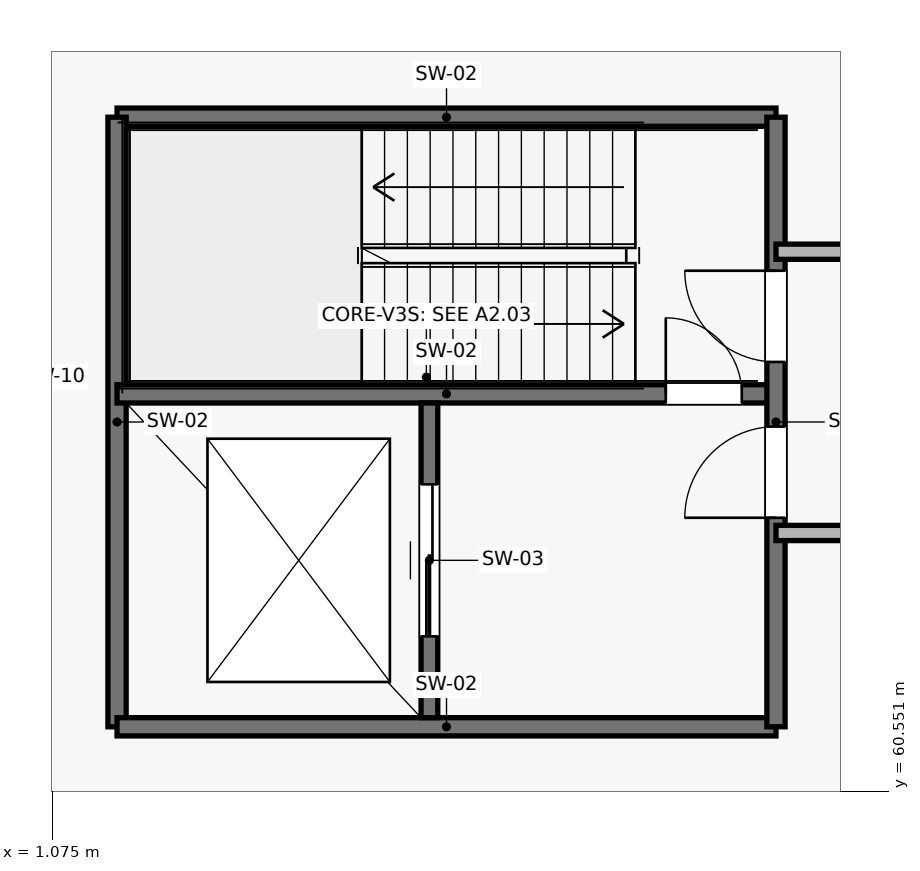
"""IFC4 building model, lengths in metres.
Left out: names, types, materials, properties, quantities, classifications, styles, units other than length and angle.
Written with IfcOpenShell. Run it as: python <this file> out.ifc"""

import sys

from ifc_helpers import new_model, si_unit, direction, frame, frame_2d, origin, place, context, subcontext, project, spatial, rectangle, extrude, element, fill, save


model = new_model("IFC4")
c1 = context("Model", 3, precision=1e-05, world=origin(), true_north=direction((0.0, 1.0)))
c2 = subcontext(c1, "Body", "Model", "MODEL_VIEW")
j1 = project(units=[si_unit("LENGTHUNIT", "METRE"), si_unit("PLANEANGLEUNIT", "RADIAN")], contexts=[c1])
p1 = place(None, origin())
s1 = spatial("IfcSite", under=j1, at=p1, CompositionType="ELEMENT")
p2 = place(p1, origin())
s2 = spatial("IfcBuilding", under=s1, at=p2, CompositionType="ELEMENT")
p3 = place(p2, frame((0.0, 0.0, 6.6)))
s3 = spatial("IfcBuildingStorey", under=s2, at=p3, CompositionType="ELEMENT", Elevation=6.6)
p4 = place(p3, frame((10.6, 69.42, 0.0), z_axis=(0.0, 0.0, 1.0), x_axis=(-1.0, 0.0, 0.0)))
e1 = element("IfcWall", 1, at=p4, inside=s3, PredefinedType="SHEAR", context=c2, shape_type="SweptSolid", body=[
    extrude(rectangle(XDim=8.67, YDim=0.24, at=frame_2d((4.335, 0.0))), origin(), (0.0, 0.0, 1.0), 4.49),
])
p5 = place(p3, frame((1.93, 69.42, 0.0), z_axis=(0.0, 0.0, 1.0), x_axis=(0.0, -1.0, 0.0)))
e2 = element("IfcWall", 2, at=p5, inside=s3, PredefinedType="SHEAR", context=c2, shape_type="SweptSolid", body=[
    extrude(rectangle(XDim=8.02, YDim=0.24, at=frame_2d((4.01, 0.0))), origin(), (0.0, 0.0, 1.0), 4.49),
])
p6 = place(p3, frame((1.93, 61.4, 0.0), z_axis=(0.0, 0.0, 1.0), x_axis=(1.0, 0.0, 0.0)))
e3 = element("IfcWall", 3, at=p6, inside=s3, PredefinedType="SHEAR", context=c2, shape_type="SweptSolid", body=[
    extrude(rectangle(XDim=8.67, YDim=0.24, at=frame_2d((4.335, 0.0))), origin(), (0.0, 0.0, 1.0), 4.49),
])
p7 = place(p3, frame((1.93, 65.78, 0.0), z_axis=(0.0, 0.0, 1.0), x_axis=(1.0, 0.0, 0.0)))
e4 = element("IfcWall", 4, at=p7, inside=s3, PredefinedType="SHEAR", context=c2, shape_type="SweptSolid", body=[
    extrude(rectangle(XDim=8.67, YDim=0.24, at=frame_2d((4.335, 0.0))), origin(), (0.0, 0.0, 1.0), 4.49),
])
p8 = place(p7, frame((7.22, 0.0, 0.0)))
e5 = element("IfcOpeningElement", 5, at=p8, cuts=e4, PredefinedType="OPENING", context=c2, shape_type="SweptSolid", body=[
    extrude(rectangle(XDim=1.0, YDim=2.2, at=frame_2d((0.5, 1.1))), frame((0.0, 0.135, 0.0), z_axis=(0.0, -1.0, 0.0), x_axis=(1.0, 0.0, 0.0)), (0.0, 0.0, 1.0), 0.27),
])
p9 = place(p3, frame((10.6, 61.4, 0.0), z_axis=(0.0, 0.0, 1.0), x_axis=(0.0, 1.0, 0.0)))
e6 = element("IfcWall", 6, at=p9, inside=s3, PredefinedType="SHEAR", context=c2, shape_type="SweptSolid", body=[
    extrude(rectangle(XDim=8.02, YDim=0.24, at=frame_2d((4.01, 0.0))), origin(), (0.0, 0.0, 1.0), 4.49),
])
p10 = place(p9, frame((2.75, 0.0, 0.0)))
e7 = element("IfcOpeningElement", 7, at=p10, cuts=e6, PredefinedType="OPENING", context=c2, shape_type="SweptSolid", body=[
    extrude(rectangle(XDim=1.2, YDim=2.2, at=frame_2d((0.6, 1.1))), frame((0.0, 0.135, 0.0), z_axis=(0.0, -1.0, 0.0), x_axis=(1.0, 0.0, 0.0)), (0.0, 0.0, 1.0), 0.27),
])
p11 = place(p9, frame((4.8, 0.0, 0.0)))
e8 = element("IfcOpeningElement", 8, at=p11, cuts=e6, PredefinedType="OPENING", context=c2, shape_type="SweptSolid", body=[
    extrude(rectangle(XDim=1.2, YDim=2.2, at=frame_2d((0.6, 1.1))), frame((0.0, 0.135, 0.0), z_axis=(0.0, -1.0, 0.0), x_axis=(1.0, 0.0, 0.0)), (0.0, 0.0, 1.0), 0.27),
])
p12 = place(p3, frame((6.04, 61.52, 0.0), z_axis=(0.0, 0.0, 1.0), x_axis=(0.0, 1.0, 0.0)))
e9 = element("IfcWall", 9, at=p12, inside=s3, PredefinedType="SHEAR", context=c2, shape_type="SweptSolid", body=[
    extrude(rectangle(XDim=4.14, YDim=0.22, at=frame_2d((2.07, 0.0))), origin(), (0.0, 0.0, 1.0), 4.49),
])
p13 = place(p12, frame((1.07, 0.0, 0.0)))
e10 = element("IfcOpeningElement", 10, at=p13, cuts=e9, PredefinedType="OPENING", context=c2, shape_type="SweptSolid", body=[
    extrude(rectangle(XDim=2.0, YDim=2.4, at=frame_2d((1.0, 1.2))), frame((0.0, 0.125, 0.0), z_axis=(0.0, -1.0, 0.0), x_axis=(1.0, 0.0, 0.0)), (0.0, 0.0, 1.0), 0.25),
])
for number, where, z_axis, x_axis in (
    (11, (10.6, 63.95, 0.0), (0.0, 0.0, 1.0), (1.0, 0.0, 0.0)),
    (12, (10.6, 67.65, 0.0), (0.0, 0.0, 1.0), (1.0, 0.0, 0.0)),
):
    element("IfcWall", number, at=place(p3, frame(where, z_axis=z_axis, x_axis=x_axis)), inside=s3, PredefinedType="PARTITIONING", context=c2, shape_type="SweptSolid", body=[
        extrude(rectangle(XDim=7.6, YDim=0.2, at=frame_2d((3.8, 0.0))), origin(), (0.0, 0.0, 1.0), 3.673),
    ])
p14 = place(p10, origin())
e13 = element("IfcDoor", 13, at=p14, inside=s3, OperationType="SINGLE_SWING_LEFT", PredefinedType="DOOR", context=c2, shape_type="SweptSolid", body=[
    extrude(rectangle(XDim=1.2, YDim=2.2, at=frame_2d((0.6, 1.1))), frame((0.0, 0.025, 0.0), z_axis=(0.0, -1.0, 0.0), x_axis=(1.0, 0.0, 0.0)), (0.0, 0.0, 1.0), 0.05),
])
fill(e7, e13)
p15 = place(p11, origin())
e14 = element("IfcDoor", 14, at=p15, inside=s3, OperationType="SINGLE_SWING_RIGHT", PredefinedType="DOOR", context=c2, shape_type="SweptSolid", body=[
    extrude(rectangle(XDim=1.2, YDim=2.2, at=frame_2d((0.6, 1.1))), frame((0.0, 0.025, 0.0), z_axis=(0.0, -1.0, 0.0), x_axis=(1.0, 0.0, 0.0)), (0.0, 0.0, 1.0), 0.05),
])
fill(e8, e14)
p16 = place(p8, origin())
e15 = element("IfcDoor", 15, at=p16, inside=s3, OperationType="SINGLE_SWING_LEFT", PredefinedType="DOOR", context=c2, shape_type="SweptSolid", body=[
    extrude(rectangle(XDim=1.0, YDim=2.2, at=frame_2d((0.5, 1.1))), frame((0.0, 0.025, 0.0), z_axis=(0.0, -1.0, 0.0), x_axis=(1.0, 0.0, 0.0)), (0.0, 0.0, 1.0), 0.05),
])
fill(e5, e15)
p17 = place(p13, origin())
e16 = element("IfcDoor", 16, at=p17, inside=s3, OperationType="DOUBLE_DOOR_SLIDING", PredefinedType="DOOR", context=c2, shape_type="SweptSolid", body=[
    extrude(rectangle(XDim=2.0, YDim=2.4, at=frame_2d((1.0, 1.2))), frame((0.0, 0.025, 0.0), z_axis=(0.0, -1.0, 0.0), x_axis=(1.0, 0.0, 0.0)), (0.0, 0.0, 1.0), 0.05),
])
fill(e10, e16)
save(model, sys.argv[1])
